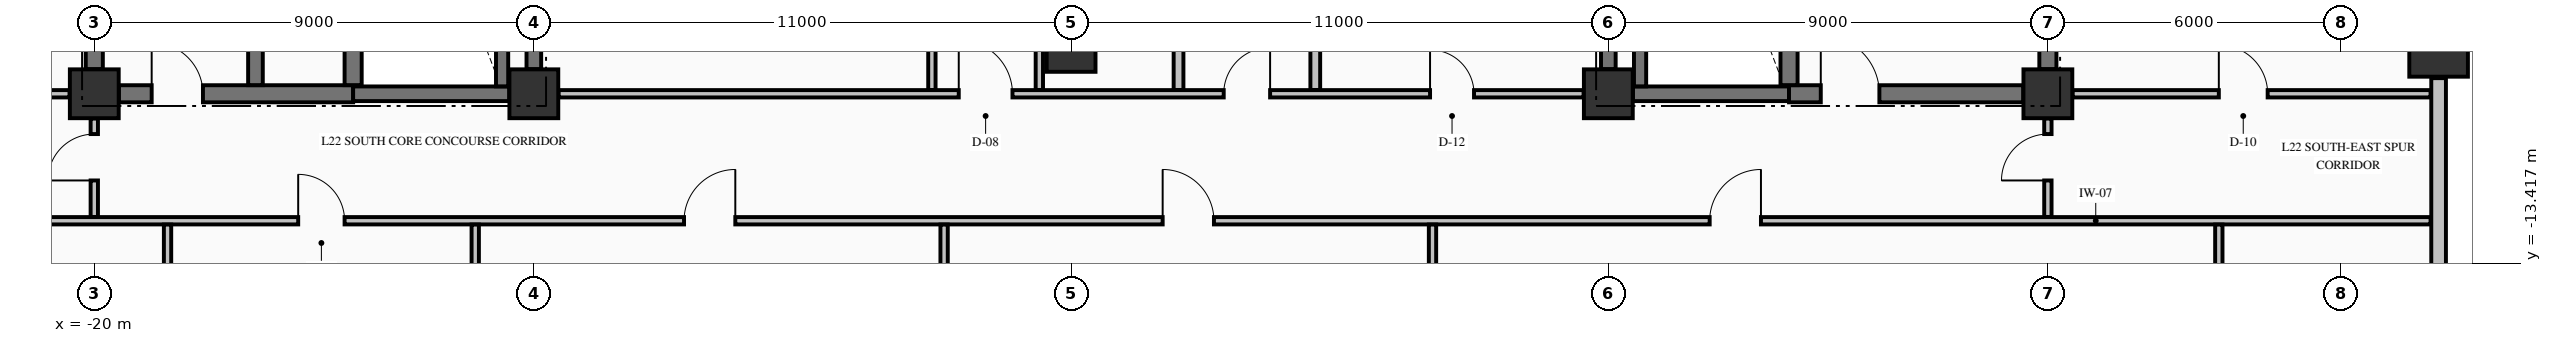
"""IFC4 building model, lengths in metres.
Left out: names, types, materials, properties, quantities, classifications, styles, units other than length and angle.
Written with IfcOpenShell. Run it as: python <this file> out.ifc"""

import sys

from ifc_helpers import new_model, si_unit, direction, frame, frame_2d, origin, origin_2d, place, context, subcontext, project, spatial, rectangle, extrude, element, fill, save


model = new_model("IFC4")
c1 = context("Model", 3, precision=1e-05, world=origin(), true_north=direction((0.0, 1.0)))
c2 = subcontext(c1, "Body", "Model", "MODEL_VIEW")
j1 = project(units=[si_unit("LENGTHUNIT", "METRE"), si_unit("PLANEANGLEUNIT", "RADIAN")], contexts=[c1])
p1 = place(None, origin())
s1 = spatial("IfcSite", under=j1, at=p1, CompositionType="ELEMENT")
p2 = place(p1, origin())
s2 = spatial("IfcBuilding", under=s1, at=p2, CompositionType="ELEMENT")
p3 = place(p2, frame((0.0, 0.0, 91.36)))
s3 = spatial("IfcBuildingStorey", under=s2, at=p3, CompositionType="ELEMENT", Elevation=91.36)
p4 = place(p3, frame((28.0, -9.0, -0.25), z_axis=(0.0, 0.0, 1.0), x_axis=(1.0, 0.0, 0.0)))
e1 = element("IfcColumn", 1, at=p4, inside=s3, PredefinedType="COLUMN", context=c2, shape_type="SweptSolid", body=[
    extrude(rectangle(XDim=1.2, YDim=1.2, at=origin_2d()), origin(), (0.0, 0.0, 1.0), 3.57),
])
for number, where, z_axis, x_axis in (
    (2, (-20.0, -9.95, -0.25), (0.0, 0.0, 1.0), (1.0, 0.0, 0.0)),
    (3, (-11.0, -9.95, -0.25), (0.0, 0.0, 1.0), (1.0, 0.0, 0.0)),
    (4, (11.0, -9.95, -0.25), (0.0, 0.0, 1.0), (1.0, 0.0, 0.0)),
    (5, (20.0, -9.95, -0.25), (0.0, 0.0, 1.0), (1.0, 0.0, 0.0)),
    (6, (0.0, -9.0, -0.25), (0.0, 0.0, 1.0), (1.0, 0.0, 0.0)),
):
    element("IfcColumn", number, at=place(p3, frame(where, z_axis=z_axis, x_axis=x_axis)), inside=s3, PredefinedType="COLUMN", context=c2, shape_type="SweptSolid", body=[
        extrude(rectangle(XDim=1.0, YDim=1.0, at=origin_2d()), origin(), (0.0, 0.0, 1.0), 3.57),
    ])
p5 = place(p3, frame((28.0, -20.37, 0.0), z_axis=(0.0, 0.0, 1.0), x_axis=(0.0, 1.0, 0.0)))
e7 = element("IfcWall", 7, at=p5, inside=s3, PredefinedType="STANDARD", context=c2, shape_type="SweptSolid", body=[
    extrude(rectangle(XDim=10.74, YDim=0.3, at=frame_2d((5.37, 0.0))), origin(), (0.0, 0.0, 1.0), 2.712),
])
p6 = place(p3, frame((-19.496, -9.95, 0.0), z_axis=(0.0, 0.0, 1.0), x_axis=(1.0, 0.0, 0.0)))
e8 = element("IfcWall", 8, at=p6, inside=s3, PredefinedType="SHEAR", context=c2, shape_type="SweptSolid", body=[
    extrude(rectangle(XDim=4.796, YDim=0.35, at=frame_2d((2.398, 0.0))), origin(), (0.0, 0.0, 1.0), 3.32),
])
p7 = place(p6, frame((0.671, 0.0, 0.0)))
e9 = element("IfcOpeningElement", 9, at=p7, cuts=e8, PredefinedType="OPENING", context=c2, shape_type="SweptSolid", body=[
    extrude(rectangle(XDim=1.05, YDim=2.15, at=frame_2d((0.525, 1.075))), frame((0.0, 0.185, 0.0), z_axis=(0.0, -1.0, 0.0), x_axis=(1.0, 0.0, 0.0)), (0.0, 0.0, 1.0), 0.37),
])
for number, where, z_axis, x_axis in (
    (10, (-14.7, -9.95, 0.0), (0.0, 0.0, 1.0), (1.0, 0.0, 0.0)),
    (11, (11.504, -9.95, 0.0), (0.0, 0.0, 1.0), (1.0, 0.0, 0.0)),
):
    element("IfcWall", number, at=place(p3, frame(where, z_axis=z_axis, x_axis=x_axis)), inside=s3, PredefinedType="SHEAR", context=c2, shape_type="SweptSolid", body=[
        extrude(rectangle(XDim=3.196, YDim=0.3, at=frame_2d((1.598, 0.0))), origin(), (0.0, 0.0, 1.0), 3.32),
    ])
p8 = place(p3, frame((14.7, -9.95, 0.0), z_axis=(0.0, 0.0, 1.0), x_axis=(1.0, 0.0, 0.0)))
e12 = element("IfcWall", 12, at=p8, inside=s3, PredefinedType="SHEAR", context=c2, shape_type="SweptSolid", body=[
    extrude(rectangle(XDim=4.796, YDim=0.35, at=frame_2d((2.398, 0.0))), origin(), (0.0, 0.0, 1.0), 3.32),
])
p9 = place(p8, frame((0.65, 0.0, 0.0)))
e13 = element("IfcOpeningElement", 13, at=p9, cuts=e12, PredefinedType="OPENING", context=c2, shape_type="SweptSolid", body=[
    extrude(rectangle(XDim=1.2, YDim=2.15, at=frame_2d((0.6, 1.075))), frame((0.0, 0.185, 0.0), z_axis=(0.0, -1.0, 0.0), x_axis=(1.0, 0.0, 0.0)), (0.0, 0.0, 1.0), 0.37),
])
p10 = place(p3, frame((-22.835, -12.55, 0.0), z_axis=(0.0, 0.0, 1.0), x_axis=(1.0, 0.0, 0.0)))
e14 = element("IfcWall", 14, at=p10, inside=s3, PredefinedType="PARTITIONING", context=c2, shape_type="SweptSolid", body=[
    extrude(rectangle(XDim=50.67, YDim=0.15, at=frame_2d((25.335, 0.0))), origin(), (0.0, 0.0, 1.0), 3.32),
])
p11 = place(p10, frame((7.01, 0.0, 0.0)))
e15 = element("IfcOpeningElement", 15, at=p11, cuts=e14, PredefinedType="OPENING", context=c2, shape_type="SweptSolid", body=[
    extrude(rectangle(XDim=0.95, YDim=2.15, at=frame_2d((0.475, 1.075))), frame((0.0, 0.085, 0.0), z_axis=(0.0, -1.0, 0.0), x_axis=(1.0, 0.0, 0.0)), (0.0, 0.0, 1.0), 0.17),
])
p12 = place(p10, frame((14.91, 0.0, 0.0)))
e16 = element("IfcOpeningElement", 16, at=p12, cuts=e14, PredefinedType="OPENING", context=c2, shape_type="SweptSolid", body=[
    extrude(rectangle(XDim=1.05, YDim=2.15, at=frame_2d((0.525, 1.075))), frame((0.0, 0.085, 0.0), z_axis=(0.0, -1.0, 0.0), x_axis=(1.0, 0.0, 0.0)), (0.0, 0.0, 1.0), 0.17),
])
p13 = place(p10, frame((24.71, 0.0, 0.0)))
e17 = element("IfcOpeningElement", 17, at=p13, cuts=e14, PredefinedType="OPENING", context=c2, shape_type="SweptSolid", body=[
    extrude(rectangle(XDim=1.05, YDim=2.15, at=frame_2d((0.525, 1.075))), frame((0.0, 0.085, 0.0), z_axis=(0.0, -1.0, 0.0), x_axis=(1.0, 0.0, 0.0)), (0.0, 0.0, 1.0), 0.17),
])
p14 = place(p10, frame((35.91, 0.0, 0.0)))
e18 = element("IfcOpeningElement", 18, at=p14, cuts=e14, PredefinedType="OPENING", context=c2, shape_type="SweptSolid", body=[
    extrude(rectangle(XDim=1.05, YDim=2.15, at=frame_2d((0.525, 1.075))), frame((0.0, 0.085, 0.0), z_axis=(0.0, -1.0, 0.0), x_axis=(1.0, 0.0, 0.0)), (0.0, 0.0, 1.0), 0.17),
])
p15 = place(p3, frame((-22.835, -9.95, 0.0), z_axis=(0.0, 0.0, 1.0), x_axis=(1.0, 0.0, 0.0)))
e19 = element("IfcWall", 19, at=p15, inside=s3, PredefinedType="PARTITIONING", context=c2, shape_type="SweptSolid", body=[
    extrude(rectangle(XDim=2.329, YDim=0.15, at=frame_2d((1.165, 0.0))), origin(), (0.0, 0.0, 1.0), 3.32),
])
p16 = place(p15, frame((0.86, 0.0, 0.0)))
e20 = element("IfcOpeningElement", 20, at=p16, cuts=e19, PredefinedType="OPENING", context=c2, shape_type="SweptSolid", body=[
    extrude(rectangle(XDim=0.95, YDim=2.15, at=frame_2d((0.475, 1.075))), frame((0.0, 0.085, 0.0), z_axis=(0.0, -1.0, 0.0), x_axis=(1.0, 0.0, 0.0)), (0.0, 0.0, 1.0), 0.17),
])
p17 = place(p3, frame((-10.494, -9.95, 0.0), z_axis=(0.0, 0.0, 1.0), x_axis=(1.0, 0.0, 0.0)))
e21 = element("IfcWall", 21, at=p17, inside=s3, PredefinedType="PARTITIONING", context=c2, shape_type="SweptSolid", body=[
    extrude(rectangle(XDim=20.988, YDim=0.15, at=frame_2d((10.494, 0.0))), origin(), (0.0, 0.0, 1.0), 3.32),
])
p18 = place(p17, frame((8.194, 0.0, 0.0)))
e22 = element("IfcOpeningElement", 22, at=p18, cuts=e21, PredefinedType="OPENING", context=c2, shape_type="SweptSolid", body=[
    extrude(rectangle(XDim=1.1, YDim=2.15, at=frame_2d((0.55, 1.075))), frame((0.0, 0.085, 0.0), z_axis=(0.0, -1.0, 0.0), x_axis=(1.0, 0.0, 0.0)), (0.0, 0.0, 1.0), 0.17),
])
p19 = place(p17, frame((13.619, 0.0, 0.0)))
e23 = element("IfcOpeningElement", 23, at=p19, cuts=e21, PredefinedType="OPENING", context=c2, shape_type="SweptSolid", body=[
    extrude(rectangle(XDim=0.95, YDim=2.15, at=frame_2d((0.475, 1.075))), frame((0.0, 0.085, 0.0), z_axis=(0.0, -1.0, 0.0), x_axis=(1.0, 0.0, 0.0)), (0.0, 0.0, 1.0), 0.17),
])
p20 = place(p17, frame((17.844, 0.0, 0.0)))
e24 = element("IfcOpeningElement", 24, at=p20, cuts=e21, PredefinedType="OPENING", context=c2, shape_type="SweptSolid", body=[
    extrude(rectangle(XDim=0.9, YDim=2.15, at=frame_2d((0.45, 1.075))), frame((0.0, 0.085, 0.0), z_axis=(0.0, -1.0, 0.0), x_axis=(1.0, 0.0, 0.0)), (0.0, 0.0, 1.0), 0.17),
])
p21 = place(p3, frame((20.506, -9.95, 0.0), z_axis=(0.0, 0.0, 1.0), x_axis=(1.0, 0.0, 0.0)))
e25 = element("IfcWall", 25, at=p21, inside=s3, PredefinedType="PARTITIONING", context=c2, shape_type="SweptSolid", body=[
    extrude(rectangle(XDim=7.329, YDim=0.15, at=frame_2d((3.665, 0.0))), origin(), (0.0, 0.0, 1.0), 3.32),
])
p22 = place(p21, frame((2.994, 0.0, 0.0)))
e26 = element("IfcOpeningElement", 26, at=p22, cuts=e25, PredefinedType="OPENING", context=c2, shape_type="SweptSolid", body=[
    extrude(rectangle(XDim=1.0, YDim=2.15, at=frame_2d((0.5, 1.075))), frame((0.0, 0.085, 0.0), z_axis=(0.0, -1.0, 0.0), x_axis=(1.0, 0.0, 0.0)), (0.0, 0.0, 1.0), 0.17),
])
p23 = place(p3, frame((-20.0, -9.446, 0.0), z_axis=(0.0, 0.0, 1.0), x_axis=(0.0, 1.0, 0.0)))
e27 = element("IfcWall", 27, at=p23, inside=s3, PredefinedType="SHEAR", context=c2, shape_type="SweptSolid", body=[
    extrude(rectangle(XDim=8.942, YDim=0.35, at=frame_2d((4.471, 0.0))), origin(), (0.0, 0.0, 1.0), 3.32),
])
p24 = place(p3, frame((-16.7, -9.773, 0.0), z_axis=(0.0, 0.0, 1.0), x_axis=(0.0, 1.0, 0.0)))
e28 = element("IfcWall", 28, at=p24, inside=s3, PredefinedType="SHEAR", context=c2, shape_type="SweptSolid", body=[
    extrude(rectangle(XDim=9.371, YDim=0.3, at=frame_2d((4.686, 0.0))), origin(), (0.0, 0.0, 1.0), 3.32),
])
p25 = place(p3, frame((-14.7, -9.773, 0.0), z_axis=(0.0, 0.0, 1.0), x_axis=(0.0, 1.0, 0.0)))
e29 = element("IfcWall", 29, at=p25, inside=s3, PredefinedType="SHEAR", context=c2, shape_type="SweptSolid", body=[
    extrude(rectangle(XDim=9.371, YDim=0.35, at=frame_2d((4.686, 0.0))), origin(), (0.0, 0.0, 1.0), 3.32),
])
p26 = place(p3, frame((-11.65, -9.798, 0.0), z_axis=(0.0, 0.0, 1.0), x_axis=(0.0, 1.0, 0.0)))
e30 = element("IfcWall", 30, at=p26, inside=s3, PredefinedType="SOLIDWALL", context=c2, shape_type="SweptSolid", body=[
    extrude(rectangle(XDim=9.396, YDim=0.25, at=frame_2d((4.698, 0.0))), origin(), (0.0, 0.0, 1.0), 3.32),
])
for number, where, z_axis, x_axis in (
    (31, (-11.0, -9.446, 0.0), (0.0, 0.0, 1.0), (0.0, 1.0, 0.0)),
    (32, (11.0, -9.446, 0.0), (0.0, 0.0, 1.0), (0.0, 1.0, 0.0)),
):
    element("IfcWall", number, at=place(p3, frame(where, z_axis=z_axis, x_axis=x_axis)), inside=s3, PredefinedType="SHEAR", context=c2, shape_type="SweptSolid", body=[
        extrude(rectangle(XDim=8.942, YDim=0.3, at=frame_2d((4.471, 0.0))), origin(), (0.0, 0.0, 1.0), 3.32),
    ])
p27 = place(p3, frame((11.65, -9.798, 0.0), z_axis=(0.0, 0.0, 1.0), x_axis=(0.0, 1.0, 0.0)))
e33 = element("IfcWall", 33, at=p27, inside=s3, PredefinedType="SOLIDWALL", context=c2, shape_type="SweptSolid", body=[
    extrude(rectangle(XDim=9.396, YDim=0.25, at=frame_2d((4.698, 0.0))), origin(), (0.0, 0.0, 1.0), 3.32),
])
p28 = place(p3, frame((14.7, -9.773, 0.0), z_axis=(0.0, 0.0, 1.0), x_axis=(0.0, 1.0, 0.0)))
e34 = element("IfcWall", 34, at=p28, inside=s3, PredefinedType="SHEAR", context=c2, shape_type="SweptSolid", body=[
    extrude(rectangle(XDim=9.371, YDim=0.35, at=frame_2d((4.686, 0.0))), origin(), (0.0, 0.0, 1.0), 3.32),
])
p29 = place(p3, frame((20.0, -9.446, 0.0), z_axis=(0.0, 0.0, 1.0), x_axis=(0.0, 1.0, 0.0)))
e35 = element("IfcWall", 35, at=p29, inside=s3, PredefinedType="SHEAR", context=c2, shape_type="SweptSolid", body=[
    extrude(rectangle(XDim=2.269, YDim=0.35, at=frame_2d((1.135, 0.0))), origin(), (0.0, 0.0, 1.0), 3.32),
])
p30 = place(p3, frame((-20.0, -12.472, 0.0), z_axis=(0.0, 0.0, 1.0), x_axis=(0.0, 1.0, 0.0)))
e36 = element("IfcWall", 36, at=p30, inside=s3, PredefinedType="PARTITIONING", context=c2, shape_type="SweptSolid", body=[
    extrude(rectangle(XDim=2.016, YDim=0.15, at=frame_2d((1.008, 0.0))), origin(), (0.0, 0.0, 1.0), 2.81),
])
p31 = place(p30, frame((0.747, 0.0, 0.0)))
e37 = element("IfcOpeningElement", 37, at=p31, cuts=e36, PredefinedType="OPENING", context=c2, shape_type="SweptSolid", body=[
    extrude(rectangle(XDim=0.95, YDim=2.15, at=frame_2d((0.475, 1.075))), frame((0.0, 0.085, 0.0), z_axis=(0.0, -1.0, 0.0), x_axis=(1.0, 0.0, 0.0)), (0.0, 0.0, 1.0), 0.17),
])
p32 = place(p3, frame((-18.5, -20.394, 0.0), z_axis=(0.0, 0.0, 1.0), x_axis=(0.0, 1.0, 0.0)))
e38 = element("IfcWall", 38, at=p32, inside=s3, PredefinedType="PARTITIONING", context=c2, shape_type="SweptSolid", body=[
    extrude(rectangle(XDim=7.766, YDim=0.15, at=frame_2d((3.883, 0.0))), origin(), (0.0, 0.0, 1.0), 3.32),
])
p33 = place(p3, frame((-12.2, -25.335, 0.0), z_axis=(0.0, 0.0, 1.0), x_axis=(0.0, 1.0, 0.0)))
e39 = element("IfcWall", 39, at=p33, inside=s3, PredefinedType="PARTITIONING", context=c2, shape_type="SweptSolid", body=[
    extrude(rectangle(XDim=12.707, YDim=0.15, at=frame_2d((6.354, 0.0))), origin(), (0.0, 0.0, 1.0), 3.32),
])
p34 = place(p3, frame((-2.85, -9.872, 0.0), z_axis=(0.0, 0.0, 1.0), x_axis=(0.0, 1.0, 0.0)))
e40 = element("IfcWall", 40, at=p34, inside=s3, PredefinedType="PARTITIONING", context=c2, shape_type="SweptSolid", body=[
    extrude(rectangle(XDim=9.544, YDim=0.15, at=frame_2d((4.772, 0.0))), origin(), (0.0, 0.0, 1.0), 3.32),
])
p35 = place(p3, frame((-2.6, -25.335, 0.0), z_axis=(0.0, 0.0, 1.0), x_axis=(0.0, 1.0, 0.0)))
e41 = element("IfcWall", 41, at=p35, inside=s3, PredefinedType="PARTITIONING", context=c2, shape_type="SweptSolid", body=[
    extrude(rectangle(XDim=12.707, YDim=0.15, at=frame_2d((6.354, 0.0))), origin(), (0.0, 0.0, 1.0), 3.32),
])
p36 = place(p3, frame((-0.65, -9.872, 0.0), z_axis=(0.0, 0.0, 1.0), x_axis=(0.0, 1.0, 0.0)))
e42 = element("IfcWall", 42, at=p36, inside=s3, PredefinedType="PARTITIONING", context=c2, shape_type="SweptSolid", body=[
    extrude(rectangle(XDim=4.419, YDim=0.15, at=frame_2d((2.209, 0.0))), origin(), (0.0, 0.0, 1.0), 3.32),
])
p37 = place(p36, frame((2.597, 0.0, 0.0)))
e43 = element("IfcOpeningElement", 43, at=p37, cuts=e42, PredefinedType="OPENING", context=c2, shape_type="SweptSolid", body=[
    extrude(rectangle(XDim=0.95, YDim=2.15, at=frame_2d((0.475, 1.075))), frame((0.0, 0.085, 0.0), z_axis=(0.0, -1.0, 0.0), x_axis=(1.0, 0.0, 0.0)), (0.0, 0.0, 1.0), 0.17),
])
for number, where, z_axis, x_axis in (
    (44, (2.2, -9.872, 0.0), (0.0, 0.0, 1.0), (0.0, 1.0, 0.0)),
    (45, (5.0, -9.872, 0.0), (0.0, 0.0, 1.0), (0.0, 1.0, 0.0)),
):
    element("IfcWall", number, at=place(p3, frame(where, z_axis=z_axis, x_axis=x_axis)), inside=s3, PredefinedType="PARTITIONING", context=c2, shape_type="SweptSolid", body=[
        extrude(rectangle(XDim=4.419, YDim=0.2, at=frame_2d((2.209, 0.0))), origin(), (0.0, 0.0, 1.0), 3.32),
    ])
p38 = place(p3, frame((7.4, -25.335, 0.0), z_axis=(0.0, 0.0, 1.0), x_axis=(0.0, 1.0, 0.0)))
e46 = element("IfcWall", 46, at=p38, inside=s3, PredefinedType="PARTITIONING", context=c2, shape_type="SweptSolid", body=[
    extrude(rectangle(XDim=12.707, YDim=0.15, at=frame_2d((6.354, 0.0))), origin(), (0.0, 0.0, 1.0), 3.32),
])
p39 = place(p3, frame((20.0, -12.472, 0.0), z_axis=(0.0, 0.0, 1.0), x_axis=(0.0, 1.0, 0.0)))
e47 = element("IfcWall", 47, at=p39, inside=s3, PredefinedType="PARTITIONING", context=c2, shape_type="SweptSolid", body=[
    extrude(rectangle(XDim=2.016, YDim=0.15, at=frame_2d((1.008, 0.0))), origin(), (0.0, 0.0, 1.0), 2.81),
])
p40 = place(p39, frame((0.747, 0.0, 0.0)))
e48 = element("IfcOpeningElement", 48, at=p40, cuts=e47, PredefinedType="OPENING", context=c2, shape_type="SweptSolid", body=[
    extrude(rectangle(XDim=0.95, YDim=2.15, at=frame_2d((0.475, 1.075))), frame((0.0, 0.085, 0.0), z_axis=(0.0, -1.0, 0.0), x_axis=(1.0, 0.0, 0.0)), (0.0, 0.0, 1.0), 0.17),
])
p41 = place(p3, frame((23.5, -20.394, 0.0), z_axis=(0.0, 0.0, 1.0), x_axis=(0.0, 1.0, 0.0)))
e49 = element("IfcWall", 49, at=p41, inside=s3, PredefinedType="PARTITIONING", context=c2, shape_type="SweptSolid", body=[
    extrude(rectangle(XDim=7.766, YDim=0.15, at=frame_2d((3.883, 0.0))), origin(), (0.0, 0.0, 1.0), 3.32),
])
p42 = place(p7, origin())
e50 = element("IfcDoor", 50, at=p42, inside=s3, OperationType="SINGLE_SWING_LEFT", PredefinedType="DOOR", context=c2, shape_type="SweptSolid", body=[
    extrude(rectangle(XDim=1.05, YDim=2.15, at=frame_2d((0.525, 1.075))), frame((0.0, 0.025, 0.0), z_axis=(0.0, -1.0, 0.0), x_axis=(1.0, 0.0, 0.0)), (0.0, 0.0, 1.0), 0.05),
])
fill(e9, e50)
p43 = place(p9, origin())
e51 = element("IfcDoor", 51, at=p43, inside=s3, OperationType="SINGLE_SWING_LEFT", PredefinedType="DOOR", context=c2, shape_type="SweptSolid", body=[
    extrude(rectangle(XDim=1.2, YDim=2.15, at=frame_2d((0.6, 1.075))), frame((0.0, 0.025, 0.0), z_axis=(0.0, -1.0, 0.0), x_axis=(1.0, 0.0, 0.0)), (0.0, 0.0, 1.0), 0.05),
])
fill(e13, e51)
p44 = place(p18, origin())
e52 = element("IfcDoor", 52, at=p44, inside=s3, OperationType="SINGLE_SWING_LEFT", PredefinedType="DOOR", context=c2, shape_type="SweptSolid", body=[
    extrude(rectangle(XDim=1.1, YDim=2.15, at=frame_2d((0.55, 1.075))), frame((0.0, 0.025, 0.0), z_axis=(0.0, -1.0, 0.0), x_axis=(1.0, 0.0, 0.0)), (0.0, 0.0, 1.0), 0.05),
])
fill(e22, e52)
p45 = place(p11, origin())
e53 = element("IfcDoor", 53, at=p45, inside=s3, OperationType="SINGLE_SWING_LEFT", PredefinedType="DOOR", context=c2, shape_type="SweptSolid", body=[
    extrude(rectangle(XDim=0.95, YDim=2.15, at=frame_2d((0.475, 1.075))), frame((0.0, 0.025, 0.0), z_axis=(0.0, -1.0, 0.0), x_axis=(1.0, 0.0, 0.0)), (0.0, 0.0, 1.0), 0.05),
])
fill(e15, e53)
p46 = place(p12, origin())
e54 = element("IfcDoor", 54, at=p46, inside=s3, OperationType="SINGLE_SWING_RIGHT", PredefinedType="DOOR", context=c2, shape_type="SweptSolid", body=[
    extrude(rectangle(XDim=1.05, YDim=2.15, at=frame_2d((0.525, 1.075))), frame((0.0, 0.025, 0.0), z_axis=(0.0, -1.0, 0.0), x_axis=(1.0, 0.0, 0.0)), (0.0, 0.0, 1.0), 0.05),
])
fill(e16, e54)
p47 = place(p13, origin())
e55 = element("IfcDoor", 55, at=p47, inside=s3, OperationType="SINGLE_SWING_LEFT", PredefinedType="DOOR", context=c2, shape_type="SweptSolid", body=[
    extrude(rectangle(XDim=1.05, YDim=2.15, at=frame_2d((0.525, 1.075))), frame((0.0, 0.025, 0.0), z_axis=(0.0, -1.0, 0.0), x_axis=(1.0, 0.0, 0.0)), (0.0, 0.0, 1.0), 0.05),
])
fill(e17, e55)
p48 = place(p14, origin())
e56 = element("IfcDoor", 56, at=p48, inside=s3, OperationType="SINGLE_SWING_RIGHT", PredefinedType="DOOR", context=c2, shape_type="SweptSolid", body=[
    extrude(rectangle(XDim=1.05, YDim=2.15, at=frame_2d((0.525, 1.075))), frame((0.0, 0.025, 0.0), z_axis=(0.0, -1.0, 0.0), x_axis=(1.0, 0.0, 0.0)), (0.0, 0.0, 1.0), 0.05),
])
fill(e18, e56)
p49 = place(p19, origin())
e57 = element("IfcDoor", 57, at=p49, inside=s3, OperationType="SINGLE_SWING_RIGHT", PredefinedType="DOOR", context=c2, shape_type="SweptSolid", body=[
    extrude(rectangle(XDim=0.95, YDim=2.15, at=frame_2d((0.475, 1.075))), frame((0.0, 0.025, 0.0), z_axis=(0.0, -1.0, 0.0), x_axis=(1.0, 0.0, 0.0)), (0.0, 0.0, 1.0), 0.05),
])
fill(e23, e57)
p50 = place(p20, origin())
e58 = element("IfcDoor", 58, at=p50, inside=s3, OperationType="SINGLE_SWING_LEFT", PredefinedType="DOOR", context=c2, shape_type="SweptSolid", body=[
    extrude(rectangle(XDim=0.9, YDim=2.15, at=frame_2d((0.45, 1.075))), frame((0.0, 0.025, 0.0), z_axis=(0.0, -1.0, 0.0), x_axis=(1.0, 0.0, 0.0)), (0.0, 0.0, 1.0), 0.05),
])
fill(e24, e58)
p51 = place(p31, origin())
e59 = element("IfcDoor", 59, at=p51, inside=s3, OperationType="SINGLE_SWING_LEFT", PredefinedType="DOOR", context=c2, shape_type="SweptSolid", body=[
    extrude(rectangle(XDim=0.95, YDim=2.15, at=frame_2d((0.475, 1.075))), frame((0.0, 0.025, 0.0), z_axis=(0.0, -1.0, 0.0), x_axis=(1.0, 0.0, 0.0)), (0.0, 0.0, 1.0), 0.05),
])
fill(e37, e59)
p52 = place(p40, origin())
e60 = element("IfcDoor", 60, at=p52, inside=s3, OperationType="SINGLE_SWING_LEFT", PredefinedType="DOOR", context=c2, shape_type="SweptSolid", body=[
    extrude(rectangle(XDim=0.95, YDim=2.15, at=frame_2d((0.475, 1.075))), frame((0.0, 0.025, 0.0), z_axis=(0.0, -1.0, 0.0), x_axis=(1.0, 0.0, 0.0)), (0.0, 0.0, 1.0), 0.05),
])
fill(e48, e60)
p53 = place(p22, origin())
e61 = element("IfcDoor", 61, at=p53, inside=s3, OperationType="SINGLE_SWING_LEFT", PredefinedType="DOOR", context=c2, shape_type="SweptSolid", body=[
    extrude(rectangle(XDim=1.0, YDim=2.15, at=frame_2d((0.5, 1.075))), frame((0.0, 0.025, 0.0), z_axis=(0.0, -1.0, 0.0), x_axis=(1.0, 0.0, 0.0)), (0.0, 0.0, 1.0), 0.05),
])
fill(e26, e61)
save(model, sys.argv[1])
